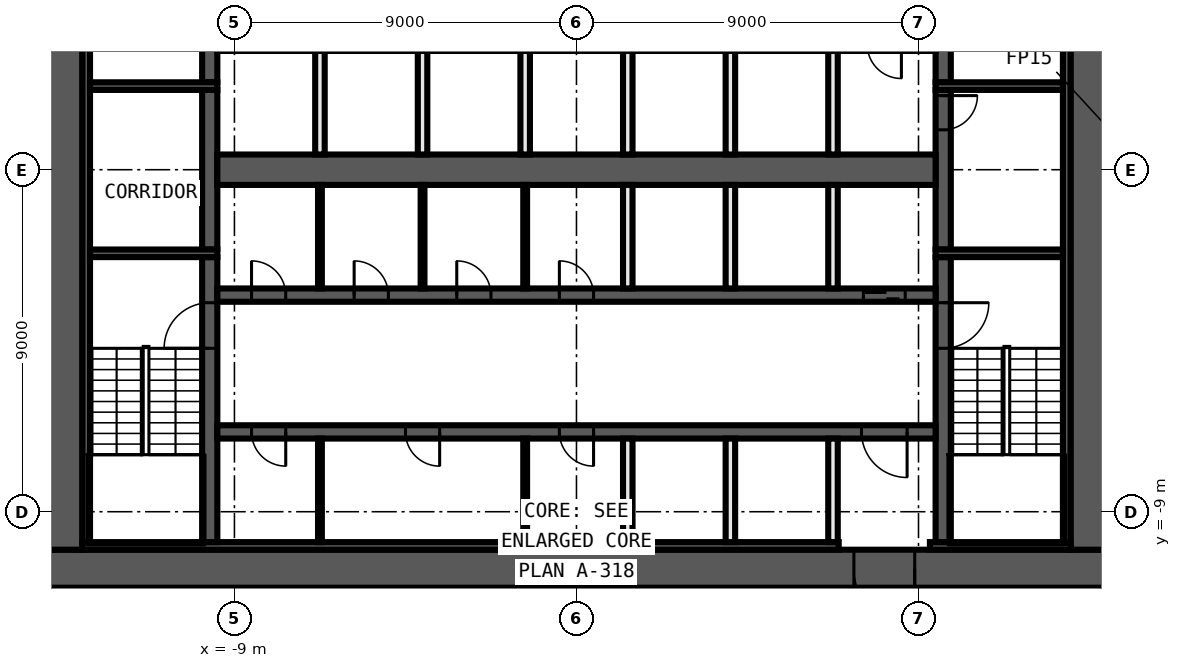
"""IFC4 building model, lengths in metres.
Left out: names, types, materials, properties, quantities, classifications, styles, units other than length and angle.
Written with IfcOpenShell. Run it as: python <this file> out.ifc"""

import sys

from ifc_helpers import new_model, si_unit, direction, frame, frame_2d, origin, place, context, subcontext, project, spatial, rectangle, extrude, element, fill, save


model = new_model("IFC4")
c1 = context("Model", 3, precision=1e-05, world=origin(), true_north=direction((0.0, 1.0)))
c2 = subcontext(c1, "Body", "Model", "MODEL_VIEW")
j1 = project(units=[si_unit("LENGTHUNIT", "METRE"), si_unit("PLANEANGLEUNIT", "RADIAN")], contexts=[c1])
p1 = place(None, origin())
s1 = spatial("IfcSite", under=j1, at=p1, CompositionType="ELEMENT")
p2 = place(p1, origin())
s2 = spatial("IfcBuilding", under=s1, at=p2, CompositionType="ELEMENT")
p3 = place(p2, frame((0.0, 0.0, 132.2)))
s3 = spatial("IfcBuildingStorey", under=s2, at=p3, CompositionType="ELEMENT", Elevation=132.2)
p4 = place(p3, frame((14.0, -10.5, 0.0), z_axis=(0.0, 0.0, 1.0), x_axis=(-1.0, 0.0, 0.0)))
e1 = element("IfcWall", 1, at=p4, inside=s3, PredefinedType="SHEAR", context=c2, shape_type="SweptSolid", body=[
    extrude(rectangle(XDim=28.0, YDim=1.0, at=frame_2d((14.0, 0.0))), origin(), (0.0, 0.0, 1.0), 3.3),
])
p5 = place(p4, frame((5.1, 0.0, 0.0)))
e2 = element("IfcOpeningElement", 2, at=p5, cuts=e1, PredefinedType="OPENING", context=c2, shape_type="SweptSolid", body=[
    extrude(rectangle(XDim=1.6, YDim=2.1, at=frame_2d((0.8, 1.05))), frame((0.0, 0.51, 0.0), z_axis=(0.0, -1.0, 0.0), x_axis=(1.0, 0.0, 0.0)), (0.0, 0.0, 1.0), 1.02),
])
for number, where, z_axis, x_axis in (
    (3, (13.5, 10.0, 0.0), (0.0, 0.0, 1.0), (0.0, -1.0, 0.0)),
    (4, (-13.5, -10.0, 0.0), (0.0, 0.0, 1.0), (0.0, 1.0, 0.0)),
):
    element("IfcWall", number, at=place(p3, frame(where, z_axis=z_axis, x_axis=x_axis)), inside=s3, PredefinedType="SHEAR", context=c2, shape_type="SweptSolid", body=[
        extrude(rectangle(XDim=20.0, YDim=1.0, at=frame_2d((10.0, 0.0))), origin(), (0.0, 0.0, 1.0), 3.3),
    ])
p6 = place(p3, frame((13.0, -9.9, 0.0), z_axis=(0.0, 0.0, 1.0), x_axis=(-1.0, 0.0, 0.0)))
e5 = element("IfcWall", 5, at=p6, inside=s3, PredefinedType="SHEAR", context=c2, shape_type="SweptSolid", body=[
    extrude(rectangle(XDim=3.7, YDim=0.2, at=frame_2d((1.85, 0.0))), origin(), (0.0, 0.0, 1.0), 3.3),
])
p7 = place(p3, frame((6.9, -9.9, 0.0), z_axis=(0.0, 0.0, 1.0), x_axis=(-1.0, 0.0, 0.0)))
e6 = element("IfcWall", 6, at=p7, inside=s3, PredefinedType="SHEAR", context=c2, shape_type="SweptSolid", body=[
    extrude(rectangle(XDim=19.9, YDim=0.2, at=frame_2d((9.95, 0.0))), origin(), (0.0, 0.0, 1.0), 3.3),
])
for number, where, z_axis, x_axis in (
    (7, (12.9, 9.8, 0.0), (0.0, 0.0, 1.0), (0.0, -1.0, 0.0)),
    (8, (-12.9, -9.8, 0.0), (0.0, 0.0, 1.0), (0.0, 1.0, 0.0)),
):
    element("IfcWall", number, at=place(p3, frame(where, z_axis=z_axis, x_axis=x_axis)), inside=s3, PredefinedType="SHEAR", context=c2, shape_type="SweptSolid", body=[
        extrude(rectangle(XDim=19.6, YDim=0.2, at=frame_2d((9.8, 0.0))), origin(), (0.0, 0.0, 1.0), 3.3),
    ])
p8 = place(p3, frame((9.65, -2.3, 0.0), z_axis=(0.0, 0.0, 1.0), x_axis=(0.0, -1.0, 0.0)))
e9 = element("IfcWall", 9, at=p8, inside=s3, PredefinedType="SHEAR", context=c2, shape_type="SweptSolid", body=[
    extrude(rectangle(XDim=7.5, YDim=0.4, at=frame_2d((3.75, 0.0))), origin(), (0.0, 0.0, 1.0), 3.3),
])
p9 = place(p8, frame((1.2, 0.0, 0.0)))
e10 = element("IfcOpeningElement", 10, at=p9, cuts=e9, PredefinedType="OPENING", context=c2, shape_type="SweptSolid", body=[
    extrude(rectangle(XDim=1.2, YDim=2.1, at=frame_2d((0.6, 1.05))), frame((0.0, 0.21, 0.0), z_axis=(0.0, -1.0, 0.0), x_axis=(1.0, 0.0, 0.0)), (0.0, 0.0, 1.0), 0.42),
])
p10 = place(p3, frame((9.65, 2.1, 0.0), z_axis=(0.0, 0.0, 1.0), x_axis=(0.0, -1.0, 0.0)))
e11 = element("IfcWall", 11, at=p10, inside=s3, PredefinedType="SHEAR", context=c2, shape_type="SweptSolid", body=[
    extrude(rectangle(XDim=4.2, YDim=0.4, at=frame_2d((2.1, 0.0))), origin(), (0.0, 0.0, 1.0), 3.3),
])
p11 = place(p10, frame((0.15, 0.0, 0.0)))
e12 = element("IfcOpeningElement", 12, at=p11, cuts=e11, PredefinedType="OPENING", context=c2, shape_type="SweptSolid", body=[
    extrude(rectangle(XDim=0.9, YDim=2.1, at=frame_2d((0.45, 1.05))), frame((0.0, 0.21, 0.0), z_axis=(0.0, -1.0, 0.0), x_axis=(1.0, 0.0, 0.0)), (0.0, 0.0, 1.0), 0.42),
])
p12 = place(p3, frame((9.65, 9.8, 0.0), z_axis=(0.0, 0.0, 1.0), x_axis=(0.0, -1.0, 0.0)))
e13 = element("IfcWall", 13, at=p12, inside=s3, PredefinedType="SHEAR", context=c2, shape_type="SweptSolid", body=[
    extrude(rectangle(XDim=7.5, YDim=0.4, at=frame_2d((3.75, 0.0))), origin(), (0.0, 0.0, 1.0), 3.3),
])
p13 = place(p12, frame((5.1, 0.0, 0.0)))
e14 = element("IfcOpeningElement", 14, at=p13, cuts=e13, PredefinedType="OPENING", context=c2, shape_type="SweptSolid", body=[
    extrude(rectangle(XDim=1.2, YDim=2.1, at=frame_2d((0.6, 1.05))), frame((0.0, 0.21, 0.0), z_axis=(0.0, -1.0, 0.0), x_axis=(1.0, 0.0, 0.0)), (0.0, 0.0, 1.0), 0.42),
])
p14 = place(p3, frame((-9.65, -9.8, 0.0), z_axis=(0.0, 0.0, 1.0), x_axis=(0.0, 1.0, 0.0)))
e15 = element("IfcWall", 15, at=p14, inside=s3, PredefinedType="SHEAR", context=c2, shape_type="SweptSolid", body=[
    extrude(rectangle(XDim=7.5, YDim=0.4, at=frame_2d((3.75, 0.0))), origin(), (0.0, 0.0, 1.0), 3.3),
])
p15 = place(p14, frame((5.1, 0.0, 0.0)))
e16 = element("IfcOpeningElement", 16, at=p15, cuts=e15, PredefinedType="OPENING", context=c2, shape_type="SweptSolid", body=[
    extrude(rectangle(XDim=1.2, YDim=2.1, at=frame_2d((0.6, 1.05))), frame((0.0, 0.21, 0.0), z_axis=(0.0, -1.0, 0.0), x_axis=(1.0, 0.0, 0.0)), (0.0, 0.0, 1.0), 0.42),
])
p16 = place(p3, frame((-9.65, -2.1, 0.0), z_axis=(0.0, 0.0, 1.0), x_axis=(0.0, 1.0, 0.0)))
e17 = element("IfcWall", 17, at=p16, inside=s3, PredefinedType="SHEAR", context=c2, shape_type="SweptSolid", body=[
    extrude(rectangle(XDim=4.2, YDim=0.4, at=frame_2d((2.1, 0.0))), origin(), (0.0, 0.0, 1.0), 3.3),
])
p17 = place(p3, frame((-9.65, 2.3, 0.0), z_axis=(0.0, 0.0, 1.0), x_axis=(0.0, 1.0, 0.0)))
e18 = element("IfcWall", 18, at=p17, inside=s3, PredefinedType="SHEAR", context=c2, shape_type="SweptSolid", body=[
    extrude(rectangle(XDim=7.5, YDim=0.4, at=frame_2d((3.75, 0.0))), origin(), (0.0, 0.0, 1.0), 3.3),
])
p18 = place(p17, frame((1.2, 0.0, 0.0)))
e19 = element("IfcOpeningElement", 19, at=p18, cuts=e18, PredefinedType="OPENING", context=c2, shape_type="SweptSolid", body=[
    extrude(rectangle(XDim=1.2, YDim=2.1, at=frame_2d((0.6, 1.05))), frame((0.0, 0.21, 0.0), z_axis=(0.0, -1.0, 0.0), x_axis=(1.0, 0.0, 0.0)), (0.0, 0.0, 1.0), 0.42),
])
for number, where, z_axis, x_axis in (
    (20, (9.45, 2.2, 0.0), (0.0, 0.0, 1.0), (1.0, 0.0, 0.0)),
    (21, (-9.45, 2.2, 0.0), (0.0, 0.0, 1.0), (-1.0, 0.0, 0.0)),
    (22, (9.45, -2.2, 0.0), (0.0, 0.0, 1.0), (1.0, 0.0, 0.0)),
    (23, (-9.45, -2.2, 0.0), (0.0, 0.0, 1.0), (-1.0, 0.0, 0.0)),
):
    element("IfcWall", number, at=place(p3, frame(where, z_axis=z_axis, x_axis=x_axis)), inside=s3, PredefinedType="SHEAR", context=c2, shape_type="SweptSolid", body=[
        extrude(rectangle(XDim=3.35, YDim=0.2, at=frame_2d((1.675, 0.0))), origin(), (0.0, 0.0, 1.0), 3.3),
    ])
p19 = place(p3, frame((-9.45, -3.3, 0.0), z_axis=(0.0, 0.0, 1.0), x_axis=(1.0, 0.0, 0.0)))
e24 = element("IfcWall", 24, at=p19, inside=s3, PredefinedType="SHEAR", context=c2, shape_type="SweptSolid", body=[
    extrude(rectangle(XDim=18.9, YDim=0.35, at=frame_2d((9.45, 0.0))), origin(), (0.0, 0.0, 1.0), 3.3),
])
p20 = place(p19, frame((17.0, 0.0, 0.0)))
e25 = element("IfcOpeningElement", 25, at=p20, cuts=e24, PredefinedType="OPENING", context=c2, shape_type="SweptSolid", body=[
    extrude(rectangle(XDim=1.1, YDim=2.1, at=frame_2d((0.55, 1.05))), frame((0.0, 0.185, 0.0), z_axis=(0.0, -1.0, 0.0), x_axis=(1.0, 0.0, 0.0)), (0.0, 0.0, 1.0), 0.37),
])
p21 = place(p19, frame((0.9, 0.0, 0.0)))
e26 = element("IfcOpeningElement", 26, at=p21, cuts=e24, PredefinedType="OPENING", context=c2, shape_type="SweptSolid", body=[
    extrude(rectangle(XDim=0.9, YDim=2.1, at=frame_2d((0.45, 1.05))), frame((0.0, 0.185, 0.0), z_axis=(0.0, -1.0, 0.0), x_axis=(1.0, 0.0, 0.0)), (0.0, 0.0, 1.0), 0.37),
])
p22 = place(p19, frame((3.6, 0.0, 0.0)))
e27 = element("IfcOpeningElement", 27, at=p22, cuts=e24, PredefinedType="OPENING", context=c2, shape_type="SweptSolid", body=[
    extrude(rectangle(XDim=0.9, YDim=2.1, at=frame_2d((0.45, 1.05))), frame((0.0, 0.185, 0.0), z_axis=(0.0, -1.0, 0.0), x_axis=(1.0, 0.0, 0.0)), (0.0, 0.0, 1.0), 0.37),
])
p23 = place(p19, frame((6.3, 0.0, 0.0)))
e28 = element("IfcOpeningElement", 28, at=p23, cuts=e24, PredefinedType="OPENING", context=c2, shape_type="SweptSolid", body=[
    extrude(rectangle(XDim=0.9, YDim=2.1, at=frame_2d((0.45, 1.05))), frame((0.0, 0.185, 0.0), z_axis=(0.0, -1.0, 0.0), x_axis=(1.0, 0.0, 0.0)), (0.0, 0.0, 1.0), 0.37),
])
p24 = place(p19, frame((9.0, 0.0, 0.0)))
e29 = element("IfcOpeningElement", 29, at=p24, cuts=e24, PredefinedType="OPENING", context=c2, shape_type="SweptSolid", body=[
    extrude(rectangle(XDim=0.9, YDim=2.1, at=frame_2d((0.45, 1.05))), frame((0.0, 0.185, 0.0), z_axis=(0.0, -1.0, 0.0), x_axis=(1.0, 0.0, 0.0)), (0.0, 0.0, 1.0), 0.37),
])
p25 = place(p3, frame((9.45, -6.9, 0.0), z_axis=(0.0, 0.0, 1.0), x_axis=(-1.0, 0.0, 0.0)))
e30 = element("IfcWall", 30, at=p25, inside=s3, PredefinedType="SHEAR", context=c2, shape_type="SweptSolid", body=[
    extrude(rectangle(XDim=18.9, YDim=0.35, at=frame_2d((9.45, 0.0))), origin(), (0.0, 0.0, 1.0), 3.3),
])
p26 = place(p25, frame((0.75, 0.0, 0.0)))
e31 = element("IfcOpeningElement", 31, at=p26, cuts=e30, PredefinedType="OPENING", context=c2, shape_type="SweptSolid", body=[
    extrude(rectangle(XDim=1.2, YDim=2.1, at=frame_2d((0.6, 1.05))), frame((0.0, 0.185, 0.0), z_axis=(0.0, -1.0, 0.0), x_axis=(1.0, 0.0, 0.0)), (0.0, 0.0, 1.0), 0.37),
])
p27 = place(p25, frame((17.1, 0.0, 0.0)))
e32 = element("IfcOpeningElement", 32, at=p27, cuts=e30, PredefinedType="OPENING", context=c2, shape_type="SweptSolid", body=[
    extrude(rectangle(XDim=0.9, YDim=2.1, at=frame_2d((0.45, 1.05))), frame((0.0, 0.185, 0.0), z_axis=(0.0, -1.0, 0.0), x_axis=(1.0, 0.0, 0.0)), (0.0, 0.0, 1.0), 0.37),
])
p28 = place(p25, frame((13.05, 0.0, 0.0)))
e33 = element("IfcOpeningElement", 33, at=p28, cuts=e30, PredefinedType="OPENING", context=c2, shape_type="SweptSolid", body=[
    extrude(rectangle(XDim=0.9, YDim=2.1, at=frame_2d((0.45, 1.05))), frame((0.0, 0.185, 0.0), z_axis=(0.0, -1.0, 0.0), x_axis=(1.0, 0.0, 0.0)), (0.0, 0.0, 1.0), 0.37),
])
p29 = place(p25, frame((9.0, 0.0, 0.0)))
e34 = element("IfcOpeningElement", 34, at=p29, cuts=e30, PredefinedType="OPENING", context=c2, shape_type="SweptSolid", body=[
    extrude(rectangle(XDim=0.9, YDim=2.1, at=frame_2d((0.45, 1.05))), frame((0.0, 0.185, 0.0), z_axis=(0.0, -1.0, 0.0), x_axis=(1.0, 0.0, 0.0)), (0.0, 0.0, 1.0), 0.37),
])
p30 = place(p3, frame((-9.45, 0.0, 0.0), z_axis=(0.0, 0.0, 1.0), x_axis=(1.0, 0.0, 0.0)))
e35 = element("IfcWall", 35, at=p30, inside=s3, PredefinedType="SHEAR", context=c2, shape_type="SweptSolid", body=[
    extrude(rectangle(XDim=18.9, YDim=0.8, at=frame_2d((9.45, 0.0))), origin(), (0.0, 0.0, 1.0), 3.3),
])
for number, where, z_axis, x_axis in (
    (36, (6.75, -9.8, 0.0), (0.0, 0.0, 1.0), (0.0, 1.0, 0.0)),
    (37, (6.75, -3.125, 0.0), (0.0, 0.0, 1.0), (0.0, 1.0, 0.0)),
    (38, (6.75, 0.4, 0.0), (0.0, 0.0, 1.0), (0.0, 1.0, 0.0)),
    (39, (4.05, -9.8, 0.0), (0.0, 0.0, 1.0), (0.0, 1.0, 0.0)),
    (40, (4.05, -3.125, 0.0), (0.0, 0.0, 1.0), (0.0, 1.0, 0.0)),
    (41, (4.05, 0.4, 0.0), (0.0, 0.0, 1.0), (0.0, 1.0, 0.0)),
    (42, (1.35, -9.8, 0.0), (0.0, 0.0, 1.0), (0.0, 1.0, 0.0)),
    (43, (1.35, -3.125, 0.0), (0.0, 0.0, 1.0), (0.0, 1.0, 0.0)),
    (44, (1.35, 0.4, 0.0), (0.0, 0.0, 1.0), (0.0, 1.0, 0.0)),
):
    element("IfcWall", number, at=place(p3, frame(where, z_axis=z_axis, x_axis=x_axis)), inside=s3, PredefinedType="SOLIDWALL", context=c2, shape_type="SweptSolid", body=[
        extrude(rectangle(XDim=2.725, YDim=0.25, at=frame_2d((1.363, 0.0))), origin(), (0.0, 0.0, 1.0), 3.3),
    ])
for number, where, z_axis, x_axis in (
    (45, (-1.35, -9.8, 0.0), (0.0, 0.0, 1.0), (0.0, 1.0, 0.0)),
    (46, (-1.35, -3.125, 0.0), (0.0, 0.0, 1.0), (0.0, 1.0, 0.0)),
):
    element("IfcWall", number, at=place(p3, frame(where, z_axis=z_axis, x_axis=x_axis)), inside=s3, PredefinedType="PARTITIONING", context=c2, shape_type="SweptSolid", body=[
        extrude(rectangle(XDim=2.725, YDim=0.1, at=frame_2d((1.363, 0.0))), origin(), (0.0, 0.0, 1.0), 3.3),
    ])
p31 = place(p3, frame((-1.35, 0.4, 0.0), z_axis=(0.0, 0.0, 1.0), x_axis=(0.0, 1.0, 0.0)))
e47 = element("IfcWall", 47, at=p31, inside=s3, PredefinedType="SOLIDWALL", context=c2, shape_type="SweptSolid", body=[
    extrude(rectangle(XDim=2.725, YDim=0.25, at=frame_2d((1.363, 0.0))), origin(), (0.0, 0.0, 1.0), 3.3),
])
p32 = place(p3, frame((-4.05, -3.125, 0.0), z_axis=(0.0, 0.0, 1.0), x_axis=(0.0, 1.0, 0.0)))
e48 = element("IfcWall", 48, at=p32, inside=s3, PredefinedType="PARTITIONING", context=c2, shape_type="SweptSolid", body=[
    extrude(rectangle(XDim=2.725, YDim=0.1, at=frame_2d((1.363, 0.0))), origin(), (0.0, 0.0, 1.0), 3.3),
])
p33 = place(p3, frame((-4.05, 0.4, 0.0), z_axis=(0.0, 0.0, 1.0), x_axis=(0.0, 1.0, 0.0)))
e49 = element("IfcWall", 49, at=p33, inside=s3, PredefinedType="SOLIDWALL", context=c2, shape_type="SweptSolid", body=[
    extrude(rectangle(XDim=2.725, YDim=0.25, at=frame_2d((1.363, 0.0))), origin(), (0.0, 0.0, 1.0), 3.3),
])
for number, where, z_axis, x_axis in (
    (50, (-6.75, -9.8, 0.0), (0.0, 0.0, 1.0), (0.0, 1.0, 0.0)),
    (51, (-6.75, -3.125, 0.0), (0.0, 0.0, 1.0), (0.0, 1.0, 0.0)),
):
    element("IfcWall", number, at=place(p3, frame(where, z_axis=z_axis, x_axis=x_axis)), inside=s3, PredefinedType="PARTITIONING", context=c2, shape_type="SweptSolid", body=[
        extrude(rectangle(XDim=2.725, YDim=0.1, at=frame_2d((1.363, 0.0))), origin(), (0.0, 0.0, 1.0), 3.3),
    ])
p34 = place(p3, frame((-6.75, 0.4, 0.0), z_axis=(0.0, 0.0, 1.0), x_axis=(0.0, 1.0, 0.0)))
e52 = element("IfcWall", 52, at=p34, inside=s3, PredefinedType="SOLIDWALL", context=c2, shape_type="SweptSolid", body=[
    extrude(rectangle(XDim=2.725, YDim=0.25, at=frame_2d((1.363, 0.0))), origin(), (0.0, 0.0, 1.0), 3.3),
])
p35 = place(p11, origin())
e53 = element("IfcDoor", 53, at=p35, inside=s3, OperationType="SINGLE_SWING_RIGHT", PredefinedType="DOOR", context=c2, shape_type="SweptSolid", body=[
    extrude(rectangle(XDim=0.9, YDim=2.1, at=frame_2d((0.45, 1.05))), frame((0.0, 0.025, 0.0), z_axis=(0.0, -1.0, 0.0), x_axis=(1.0, 0.0, 0.0)), (0.0, 0.0, 1.0), 0.05),
])
fill(e12, e53)
p36 = place(p20, origin())
e54 = element("IfcDoor", 54, at=p36, inside=s3, OperationType="DOUBLE_DOOR_SLIDING", PredefinedType="DOOR", context=c2, shape_type="SweptSolid", body=[
    extrude(rectangle(XDim=1.1, YDim=2.1, at=frame_2d((0.55, 1.05))), frame((0.0, 0.025, 0.0), z_axis=(0.0, -1.0, 0.0), x_axis=(1.0, 0.0, 0.0)), (0.0, 0.0, 1.0), 0.05),
])
fill(e25, e54)
p37 = place(p5, origin())
e55 = element("IfcDoor", 55, at=p37, inside=s3, OperationType="DOUBLE_DOOR_SINGLE_SWING", PredefinedType="DOOR", context=c2, shape_type="SweptSolid", body=[
    extrude(rectangle(XDim=1.6, YDim=2.1, at=frame_2d((0.8, 1.05))), frame((0.0, 0.025, 0.0), z_axis=(0.0, -1.0, 0.0), x_axis=(1.0, 0.0, 0.0)), (0.0, 0.0, 1.0), 0.05),
])
fill(e2, e55)
p38 = place(p26, origin())
e56 = element("IfcDoor", 56, at=p38, inside=s3, OperationType="SINGLE_SWING_LEFT", PredefinedType="DOOR", context=c2, shape_type="SweptSolid", body=[
    extrude(rectangle(XDim=1.2, YDim=2.1, at=frame_2d((0.6, 1.05))), frame((0.0, 0.025, 0.0), z_axis=(0.0, -1.0, 0.0), x_axis=(1.0, 0.0, 0.0)), (0.0, 0.0, 1.0), 0.05),
])
fill(e31, e56)
p39 = place(p21, origin())
e57 = element("IfcDoor", 57, at=p39, inside=s3, OperationType="SINGLE_SWING_RIGHT", PredefinedType="DOOR", context=c2, shape_type="SweptSolid", body=[
    extrude(rectangle(XDim=0.9, YDim=2.1, at=frame_2d((0.45, 1.05))), frame((0.0, 0.025, 0.0), z_axis=(0.0, -1.0, 0.0), x_axis=(1.0, 0.0, 0.0)), (0.0, 0.0, 1.0), 0.05),
])
fill(e26, e57)
p40 = place(p22, origin())
e58 = element("IfcDoor", 58, at=p40, inside=s3, OperationType="SINGLE_SWING_LEFT", PredefinedType="DOOR", context=c2, shape_type="SweptSolid", body=[
    extrude(rectangle(XDim=0.9, YDim=2.1, at=frame_2d((0.45, 1.05))), frame((0.0, 0.025, 0.0), z_axis=(0.0, -1.0, 0.0), x_axis=(1.0, 0.0, 0.0)), (0.0, 0.0, 1.0), 0.05),
])
fill(e27, e58)
p41 = place(p23, origin())
e59 = element("IfcDoor", 59, at=p41, inside=s3, OperationType="SINGLE_SWING_RIGHT", PredefinedType="DOOR", context=c2, shape_type="SweptSolid", body=[
    extrude(rectangle(XDim=0.9, YDim=2.1, at=frame_2d((0.45, 1.05))), frame((0.0, 0.025, 0.0), z_axis=(0.0, -1.0, 0.0), x_axis=(1.0, 0.0, 0.0)), (0.0, 0.0, 1.0), 0.05),
])
fill(e28, e59)
p42 = place(p24, origin())
e60 = element("IfcDoor", 60, at=p42, inside=s3, OperationType="SINGLE_SWING_LEFT", PredefinedType="DOOR", context=c2, shape_type="SweptSolid", body=[
    extrude(rectangle(XDim=0.9, YDim=2.1, at=frame_2d((0.45, 1.05))), frame((0.0, 0.025, 0.0), z_axis=(0.0, -1.0, 0.0), x_axis=(1.0, 0.0, 0.0)), (0.0, 0.0, 1.0), 0.05),
])
fill(e29, e60)
p43 = place(p27, origin())
e61 = element("IfcDoor", 61, at=p43, inside=s3, OperationType="SINGLE_SWING_RIGHT", PredefinedType="DOOR", context=c2, shape_type="SweptSolid", body=[
    extrude(rectangle(XDim=0.9, YDim=2.1, at=frame_2d((0.45, 1.05))), frame((0.0, 0.025, 0.0), z_axis=(0.0, -1.0, 0.0), x_axis=(1.0, 0.0, 0.0)), (0.0, 0.0, 1.0), 0.05),
])
fill(e32, e61)
p44 = place(p28, origin())
e62 = element("IfcDoor", 62, at=p44, inside=s3, OperationType="SINGLE_SWING_LEFT", PredefinedType="DOOR", context=c2, shape_type="SweptSolid", body=[
    extrude(rectangle(XDim=0.9, YDim=2.1, at=frame_2d((0.45, 1.05))), frame((0.0, 0.025, 0.0), z_axis=(0.0, -1.0, 0.0), x_axis=(1.0, 0.0, 0.0)), (0.0, 0.0, 1.0), 0.05),
])
fill(e33, e62)
p45 = place(p29, origin())
e63 = element("IfcDoor", 63, at=p45, inside=s3, OperationType="SINGLE_SWING_RIGHT", PredefinedType="DOOR", context=c2, shape_type="SweptSolid", body=[
    extrude(rectangle(XDim=0.9, YDim=2.1, at=frame_2d((0.45, 1.05))), frame((0.0, 0.025, 0.0), z_axis=(0.0, -1.0, 0.0), x_axis=(1.0, 0.0, 0.0)), (0.0, 0.0, 1.0), 0.05),
])
fill(e34, e63)
p46 = place(p9, origin())
e64 = element("IfcDoor", 64, at=p46, inside=s3, OperationType="SINGLE_SWING_RIGHT", PredefinedType="DOOR", context=c2, shape_type="SweptSolid", body=[
    extrude(rectangle(XDim=1.2, YDim=2.1, at=frame_2d((0.6, 1.05))), frame((0.0, 0.025, 0.0), z_axis=(0.0, -1.0, 0.0), x_axis=(1.0, 0.0, 0.0)), (0.0, 0.0, 1.0), 0.05),
])
fill(e10, e64)
p47 = place(p15, origin())
e65 = element("IfcDoor", 65, at=p47, inside=s3, OperationType="SINGLE_SWING_LEFT", PredefinedType="DOOR", context=c2, shape_type="SweptSolid", body=[
    extrude(rectangle(XDim=1.2, YDim=2.1, at=frame_2d((0.6, 1.05))), frame((0.0, 0.025, 0.0), z_axis=(0.0, -1.0, 0.0), x_axis=(1.0, 0.0, 0.0)), (0.0, 0.0, 1.0), 0.05),
])
fill(e16, e65)
save(model, sys.argv[1])
